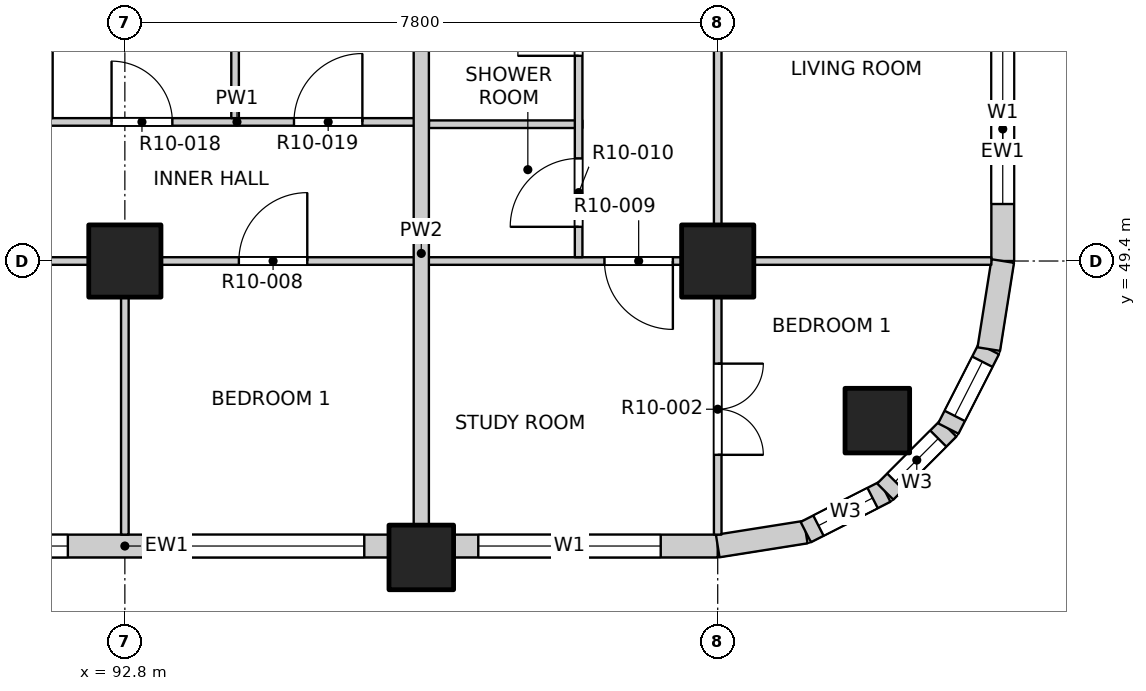
"""IFC4 building model, lengths in metres.
Left out: names, types, materials, properties, quantities, classifications, styles, units other than length and angle.
Written with IfcOpenShell. Run it as: python <this file> out.ifc"""

import sys

from ifc_helpers import new_model, si_unit, direction, frame, frame_2d, origin, origin_2d, place, context, subcontext, project, spatial, rectangle, extrude, element, fill, save


model = new_model("IFC4")
c1 = context("Model", 3, precision=1e-05, world=origin(), true_north=direction((0.0, 1.0)))
c2 = subcontext(c1, "Body", "Model", "MODEL_VIEW")
j1 = project(units=[si_unit("LENGTHUNIT", "METRE"), si_unit("PLANEANGLEUNIT", "RADIAN")], contexts=[c1])
p1 = place(None, origin())
s1 = spatial("IfcSite", under=j1, at=p1, CompositionType="ELEMENT")
p2 = place(p1, origin())
s2 = spatial("IfcBuilding", under=s1, at=p2, CompositionType="ELEMENT")
p3 = place(p2, frame((0.0, 0.0, 123.7)))
s3 = spatial("IfcBuildingStorey", under=s2, at=p3, CompositionType="ELEMENT", Elevation=123.7)
for number, where, z_axis, x_axis in (
    (1, (102.7, 47.3, -0.3), (0.0, 0.0, 1.0), (1.0, 0.0, 0.0)),
    (2, (96.7, 45.5, -0.3), (0.0, 0.0, 1.0), (1.0, 0.0, 0.0)),
):
    element("IfcColumn", number, at=place(p3, frame(where, z_axis=z_axis, x_axis=x_axis)), inside=s3, PredefinedType="COLUMN", context=c2, shape_type="SweptSolid", body=[
        extrude(rectangle(XDim=0.85, YDim=0.85, at=origin_2d()), origin(), (0.0, 0.0, 1.0), 3.45),
    ])
for number, where, z_axis, x_axis in (
    (3, (92.8, 49.4, -0.3), (0.0, 0.0, 1.0), (1.0, 0.0, 0.0)),
    (4, (100.6, 49.4, -0.3), (0.0, 0.0, 1.0), (1.0, 0.0, 0.0)),
):
    element("IfcColumn", number, at=place(p3, frame(where, z_axis=z_axis, x_axis=x_axis)), inside=s3, PredefinedType="COLUMN", context=c2, shape_type="SweptSolid", body=[
        extrude(rectangle(XDim=0.95, YDim=0.95, at=origin_2d()), origin(), (0.0, 0.0, 1.0), 3.45),
    ])
p4 = place(p3, frame((89.325, 45.65, 0.0), z_axis=(0.0, 0.0, 1.0), x_axis=(1.0, 0.0, 0.0)))
e5 = element("IfcWall", 5, at=p4, inside=s3, PredefinedType="SOLIDWALL", context=c2, shape_type="SweptSolid", body=[
    extrude(rectangle(XDim=6.95, YDim=0.3, at=frame_2d((3.475, 0.0))), origin(), (0.0, 0.0, 1.0), 2.7),
])
p5 = place(p4, frame((0.325, 0.0, 0.9)))
e6 = element("IfcOpeningElement", 6, at=p5, cuts=e5, PredefinedType="OPENING", context=c2, shape_type="SweptSolid", body=[
    extrude(rectangle(XDim=2.4, YDim=1.8, at=frame_2d((1.2, 0.9))), frame((0.0, 0.16, 0.0), z_axis=(0.0, -1.0, 0.0), x_axis=(1.0, 0.0, 0.0)), (0.0, 0.0, 1.0), 0.32),
])
p6 = place(p4, frame((4.225, 0.0, 0.9)))
e7 = element("IfcOpeningElement", 7, at=p6, cuts=e5, PredefinedType="OPENING", context=c2, shape_type="SweptSolid", body=[
    extrude(rectangle(XDim=2.4, YDim=1.8, at=frame_2d((1.2, 0.9))), frame((0.0, 0.16, 0.0), z_axis=(0.0, -1.0, 0.0), x_axis=(1.0, 0.0, 0.0)), (0.0, 0.0, 1.0), 0.32),
])
p7 = place(p3, frame((97.125, 45.65, 0.0), z_axis=(0.0, 0.0, 1.0), x_axis=(1.0, 0.0, 0.0)))
e8 = element("IfcWall", 8, at=p7, inside=s3, PredefinedType="SOLIDWALL", context=c2, shape_type="SweptSolid", body=[
    extrude(rectangle(XDim=3.475, YDim=0.3, at=frame_2d((1.738, 0.0))), origin(), (0.0, 0.0, 1.0), 2.7),
])
p8 = place(p7, frame((0.325, 0.0, 0.9)))
e9 = element("IfcOpeningElement", 9, at=p8, cuts=e8, PredefinedType="OPENING", context=c2, shape_type="SweptSolid", body=[
    extrude(rectangle(XDim=2.4, YDim=1.8, at=frame_2d((1.2, 0.9))), frame((0.0, 0.16, 0.0), z_axis=(0.0, -1.0, 0.0), x_axis=(1.0, 0.0, 0.0)), (0.0, 0.0, 1.0), 0.32),
])
p9 = place(p3, frame((104.35, 49.4, 0.0), z_axis=(0.0, 0.0, 1.0), x_axis=(0.0, 1.0, 0.0)))
e10 = element("IfcWall", 10, at=p9, inside=s3, PredefinedType="SOLIDWALL", context=c2, shape_type="SweptSolid", body=[
    extrude(rectangle(XDim=3.475, YDim=0.3, at=frame_2d((1.738, 0.0))), origin(), (0.0, 0.0, 1.0), 2.7),
])
p10 = place(p9, frame((0.75, 0.0, 0.9)))
e11 = element("IfcOpeningElement", 11, at=p10, cuts=e10, PredefinedType="OPENING", context=c2, shape_type="SweptSolid", body=[
    extrude(rectangle(XDim=2.4, YDim=1.8, at=frame_2d((1.2, 0.9))), frame((0.0, 0.16, 0.0), z_axis=(0.0, -1.0, 0.0), x_axis=(1.0, 0.0, 0.0)), (0.0, 0.0, 1.0), 0.32),
])
p11 = place(p3, frame((100.6, 45.65, 0.0), z_axis=(0.0, 0.0, 1.0), x_axis=(0.987678452879, 0.156496880861, 0.0)))
e12 = element("IfcWall", 12, at=p11, inside=s3, PredefinedType="SOLIDWALL", context=c2, shape_type="SweptSolid", body=[
    extrude(rectangle(XDim=1.173, YDim=0.3, at=frame_2d((0.586, 0.0))), origin(), (0.0, 0.0, 1.0), 2.7),
])
p12 = place(p3, frame((101.759, 45.833, 0.0), z_axis=(0.0, 0.0, 1.0), x_axis=(0.890988677504, 0.454025524128, 0.0)))
e13 = element("IfcWall", 13, at=p12, inside=s3, PredefinedType="SOLIDWALL", context=c2, shape_type="SweptSolid", body=[
    extrude(rectangle(XDim=1.173, YDim=0.3, at=frame_2d((0.587, 0.0))), origin(), (0.0, 0.0, 1.0), 2.7),
])
p13 = place(p12, frame((0.187, 0.0, 0.9)))
e14 = element("IfcOpeningElement", 14, at=p13, cuts=e13, PredefinedType="OPENING", context=c2, shape_type="SweptSolid", body=[
    extrude(rectangle(XDim=0.8, YDim=1.2, at=frame_2d((0.4, 0.6))), frame((0.0, 0.16, 0.0), z_axis=(0.0, -1.0, 0.0), x_axis=(1.0, 0.0, 0.0)), (0.0, 0.0, 1.0), 0.32),
])
p14 = place(p3, frame((102.804, 46.366, 0.0), z_axis=(0.0, 0.0, 1.0), x_axis=(0.707106781187, 0.707106781187, 0.0)))
e15 = element("IfcWall", 15, at=p14, inside=s3, PredefinedType="SOLIDWALL", context=c2, shape_type="SweptSolid", body=[
    extrude(rectangle(XDim=1.173, YDim=0.3, at=frame_2d((0.586, 0.0))), origin(), (0.0, 0.0, 1.0), 2.7),
])
p15 = place(p14, frame((0.187, 0.0, 0.9)))
e16 = element("IfcOpeningElement", 16, at=p15, cuts=e15, PredefinedType="OPENING", context=c2, shape_type="SweptSolid", body=[
    extrude(rectangle(XDim=0.8, YDim=1.2, at=frame_2d((0.4, 0.6))), frame((0.0, 0.16, 0.0), z_axis=(0.0, -1.0, 0.0), x_axis=(1.0, 0.0, 0.0)), (0.0, 0.0, 1.0), 0.32),
])
p16 = place(p3, frame((103.634, 47.196, 0.0), z_axis=(0.0, 0.0, 1.0), x_axis=(0.454025524128, 0.890988677504, 0.0)))
e17 = element("IfcWall", 17, at=p16, inside=s3, PredefinedType="SOLIDWALL", context=c2, shape_type="SweptSolid", body=[
    extrude(rectangle(XDim=1.173, YDim=0.3, at=frame_2d((0.587, 0.0))), origin(), (0.0, 0.0, 1.0), 2.7),
])
p17 = place(p16, frame((0.187, 0.0, 0.9)))
e18 = element("IfcOpeningElement", 18, at=p17, cuts=e17, PredefinedType="OPENING", context=c2, shape_type="SweptSolid", body=[
    extrude(rectangle(XDim=0.8, YDim=1.2, at=frame_2d((0.4, 0.6))), frame((0.0, 0.16, 0.0), z_axis=(0.0, -1.0, 0.0), x_axis=(1.0, 0.0, 0.0)), (0.0, 0.0, 1.0), 0.32),
])
p18 = place(p3, frame((104.167, 48.241, 0.0), z_axis=(0.0, 0.0, 1.0), x_axis=(0.156496880861, 0.987678452879, 0.0)))
e19 = element("IfcWall", 19, at=p18, inside=s3, PredefinedType="SOLIDWALL", context=c2, shape_type="SweptSolid", body=[
    extrude(rectangle(XDim=1.173, YDim=0.3, at=frame_2d((0.586, 0.0))), origin(), (0.0, 0.0, 1.0), 2.7),
])
p19 = place(p3, frame((65.8, 49.4, 0.0), z_axis=(0.0, 0.0, 1.0), x_axis=(1.0, 0.0, 0.0)))
e20 = element("IfcWall", 20, at=p19, inside=s3, PredefinedType="PARTITIONING", context=c2, shape_type="SweptSolid", body=[
    extrude(rectangle(XDim=38.4, YDim=0.1, at=frame_2d((19.2, 0.0))), origin(), (0.0, 0.0, 1.0), 3.15),
])
p20 = place(p19, frame((4.19, 0.0, 0.0)))
e21 = element("IfcOpeningElement", 21, at=p20, cuts=e20, PredefinedType="OPENING", context=c2, shape_type="SweptSolid", body=[
    extrude(rectangle(XDim=0.9, YDim=2.1, at=frame_2d((0.45, 1.05))), frame((0.0, 0.06, 0.0), z_axis=(0.0, -1.0, 0.0), x_axis=(1.0, 0.0, 0.0)), (0.0, 0.0, 1.0), 0.12),
])
p21 = place(p19, frame((9.0, 0.0, 0.0)))
e22 = element("IfcOpeningElement", 22, at=p21, cuts=e20, PredefinedType="OPENING", context=c2, shape_type="SweptSolid", body=[
    extrude(rectangle(XDim=0.9, YDim=2.1, at=frame_2d((0.45, 1.05))), frame((0.0, 0.06, 0.0), z_axis=(0.0, -1.0, 0.0), x_axis=(1.0, 0.0, 0.0)), (0.0, 0.0, 1.0), 0.12),
])
p22 = place(p19, frame((12.9, 0.0, 0.0)))
e23 = element("IfcOpeningElement", 23, at=p22, cuts=e20, PredefinedType="OPENING", context=c2, shape_type="SweptSolid", body=[
    extrude(rectangle(XDim=0.9, YDim=2.1, at=frame_2d((0.45, 1.05))), frame((0.0, 0.06, 0.0), z_axis=(0.0, -1.0, 0.0), x_axis=(1.0, 0.0, 0.0)), (0.0, 0.0, 1.0), 0.12),
])
p23 = place(p19, frame((16.8, 0.0, 0.0)))
e24 = element("IfcOpeningElement", 24, at=p23, cuts=e20, PredefinedType="OPENING", context=c2, shape_type="SweptSolid", body=[
    extrude(rectangle(XDim=0.9, YDim=2.1, at=frame_2d((0.45, 1.05))), frame((0.0, 0.06, 0.0), z_axis=(0.0, -1.0, 0.0), x_axis=(1.0, 0.0, 0.0)), (0.0, 0.0, 1.0), 0.12),
])
p24 = place(p19, frame((22.5, 0.0, 0.0)))
e25 = element("IfcOpeningElement", 25, at=p24, cuts=e20, PredefinedType="OPENING", context=c2, shape_type="SweptSolid", body=[
    extrude(rectangle(XDim=1.2, YDim=2.1, at=frame_2d((0.6, 1.05))), frame((0.0, 0.06, 0.0), z_axis=(0.0, -1.0, 0.0), x_axis=(1.0, 0.0, 0.0)), (0.0, 0.0, 1.0), 0.12),
])
p25 = place(p19, frame((28.5, 0.0, 0.0)))
e26 = element("IfcOpeningElement", 26, at=p25, cuts=e20, PredefinedType="OPENING", context=c2, shape_type="SweptSolid", body=[
    extrude(rectangle(XDim=0.9, YDim=2.1, at=frame_2d((0.45, 1.05))), frame((0.0, 0.06, 0.0), z_axis=(0.0, -1.0, 0.0), x_axis=(1.0, 0.0, 0.0)), (0.0, 0.0, 1.0), 0.12),
])
p26 = place(p19, frame((33.31, 0.0, 0.0)))
e27 = element("IfcOpeningElement", 27, at=p26, cuts=e20, PredefinedType="OPENING", context=c2, shape_type="SweptSolid", body=[
    extrude(rectangle(XDim=0.9, YDim=2.1, at=frame_2d((0.45, 1.05))), frame((0.0, 0.06, 0.0), z_axis=(0.0, -1.0, 0.0), x_axis=(1.0, 0.0, 0.0)), (0.0, 0.0, 1.0), 0.12),
])
p27 = place(p3, frame((96.8, 51.2, 0.0), z_axis=(0.0, 0.0, 1.0), x_axis=(1.0, 0.0, 0.0)))
e28 = element("IfcWall", 28, at=p27, inside=s3, PredefinedType="PARTITIONING", context=c2, shape_type="SweptSolid", body=[
    extrude(rectangle(XDim=2.02, YDim=0.1, at=frame_2d((1.01, 0.0))), origin(), (0.0, 0.0, 1.0), 3.15),
])
p28 = place(p3, frame((91.75, 51.23, 0.0), z_axis=(0.0, 0.0, 1.0), x_axis=(1.0, 0.0, 0.0)))
e29 = element("IfcWall", 29, at=p28, inside=s3, PredefinedType="PARTITIONING", context=c2, shape_type="SweptSolid", body=[
    extrude(rectangle(XDim=5.05, YDim=0.1, at=frame_2d((2.525, 0.0))), origin(), (0.0, 0.0, 1.0), 3.15),
])
p29 = place(p28, frame((0.875, 0.0, 0.0)))
e30 = element("IfcOpeningElement", 30, at=p29, cuts=e29, PredefinedType="OPENING", context=c2, shape_type="SweptSolid", body=[
    extrude(rectangle(XDim=0.8, YDim=2.1, at=frame_2d((0.4, 1.05))), frame((0.0, 0.06, 0.0), z_axis=(0.0, -1.0, 0.0), x_axis=(1.0, 0.0, 0.0)), (0.0, 0.0, 1.0), 0.12),
])
p30 = place(p28, frame((3.275, 0.0, 0.0)))
e31 = element("IfcOpeningElement", 31, at=p30, cuts=e29, PredefinedType="OPENING", context=c2, shape_type="SweptSolid", body=[
    extrude(rectangle(XDim=0.9, YDim=2.1, at=frame_2d((0.45, 1.05))), frame((0.0, 0.06, 0.0), z_axis=(0.0, -1.0, 0.0), x_axis=(1.0, 0.0, 0.0)), (0.0, 0.0, 1.0), 0.12),
])
p31 = place(p3, frame((92.8, 45.8, 0.0), z_axis=(0.0, 0.0, 1.0), x_axis=(0.0, 1.0, 0.0)))
e32 = element("IfcWall", 32, at=p31, inside=s3, PredefinedType="PARTITIONING", context=c2, shape_type="SweptSolid", body=[
    extrude(rectangle(XDim=3.55, YDim=0.1, at=frame_2d((1.775, 0.0))), origin(), (0.0, 0.0, 1.0), 3.15),
])
p32 = place(p3, frame((94.25, 51.28, 0.0), z_axis=(0.0, 0.0, 1.0), x_axis=(0.0, 1.0, 0.0)))
e33 = element("IfcWall", 33, at=p32, inside=s3, PredefinedType="PARTITIONING", context=c2, shape_type="SweptSolid", body=[
    extrude(rectangle(XDim=1.92, YDim=0.1, at=frame_2d((0.96, 0.0))), origin(), (0.0, 0.0, 1.0), 3.15),
])
p33 = place(p3, frame((96.7, 45.8, 0.0), z_axis=(0.0, 0.0, 1.0), x_axis=(0.0, 1.0, 0.0)))
e34 = element("IfcWall", 34, at=p33, inside=s3, PredefinedType="PARTITIONING", context=c2, shape_type="SweptSolid", body=[
    extrude(rectangle(XDim=7.4, YDim=0.2, at=frame_2d((3.7, 0.0))), origin(), (0.0, 0.0, 1.0), 3.15),
])
p34 = place(p3, frame((98.77, 49.45, 0.0), z_axis=(0.0, 0.0, 1.0), x_axis=(0.0, 1.0, 0.0)))
e35 = element("IfcWall", 35, at=p34, inside=s3, PredefinedType="PARTITIONING", context=c2, shape_type="SweptSolid", body=[
    extrude(rectangle(XDim=12.35, YDim=0.1, at=frame_2d((6.175, 0.0))), origin(), (0.0, 0.0, 1.0), 3.15),
])
p35 = place(p34, frame((0.4, 0.0, 0.0)))
e36 = element("IfcOpeningElement", 36, at=p35, cuts=e35, PredefinedType="OPENING", context=c2, shape_type="SweptSolid", body=[
    extrude(rectangle(XDim=0.9, YDim=2.1, at=frame_2d((0.45, 1.05))), frame((0.0, 0.06, 0.0), z_axis=(0.0, -1.0, 0.0), x_axis=(1.0, 0.0, 0.0)), (0.0, 0.0, 1.0), 0.12),
])
p36 = place(p34, frame((2.65, 0.0, 0.0)))
e37 = element("IfcOpeningElement", 37, at=p36, cuts=e35, PredefinedType="OPENING", context=c2, shape_type="SweptSolid", body=[
    extrude(rectangle(XDim=0.8, YDim=2.1, at=frame_2d((0.4, 1.05))), frame((0.0, 0.06, 0.0), z_axis=(0.0, -1.0, 0.0), x_axis=(1.0, 0.0, 0.0)), (0.0, 0.0, 1.0), 0.12),
])
p37 = place(p34, frame((5.29, 0.0, 0.0)))
e38 = element("IfcOpeningElement", 38, at=p37, cuts=e35, PredefinedType="OPENING", context=c2, shape_type="SweptSolid", body=[
    extrude(rectangle(XDim=0.8, YDim=2.1, at=frame_2d((0.4, 1.05))), frame((0.0, 0.06, 0.0), z_axis=(0.0, -1.0, 0.0), x_axis=(1.0, 0.0, 0.0)), (0.0, 0.0, 1.0), 0.12),
])
p38 = place(p34, frame((8.115, 0.0, 0.0)))
e39 = element("IfcOpeningElement", 39, at=p38, cuts=e35, PredefinedType="OPENING", context=c2, shape_type="SweptSolid", body=[
    extrude(rectangle(XDim=0.9, YDim=2.1, at=frame_2d((0.45, 1.05))), frame((0.0, 0.06, 0.0), z_axis=(0.0, -1.0, 0.0), x_axis=(1.0, 0.0, 0.0)), (0.0, 0.0, 1.0), 0.12),
])
p39 = place(p34, frame((10.85, 0.0, 0.0)))
e40 = element("IfcOpeningElement", 40, at=p39, cuts=e35, PredefinedType="OPENING", context=c2, shape_type="SweptSolid", body=[
    extrude(rectangle(XDim=0.8, YDim=2.1, at=frame_2d((0.4, 1.05))), frame((0.0, 0.06, 0.0), z_axis=(0.0, -1.0, 0.0), x_axis=(1.0, 0.0, 0.0)), (0.0, 0.0, 1.0), 0.12),
])
p40 = place(p3, frame((100.6, 45.8, 0.0), z_axis=(0.0, 0.0, 1.0), x_axis=(0.0, 1.0, 0.0)))
e41 = element("IfcWall", 41, at=p40, inside=s3, PredefinedType="PARTITIONING", context=c2, shape_type="SweptSolid", body=[
    extrude(rectangle(XDim=38.4, YDim=0.1, at=frame_2d((19.2, 0.0))), origin(), (0.0, 0.0, 1.0), 3.15),
])
p41 = place(p40, frame((1.05, 0.0, 0.0)))
e42 = element("IfcOpeningElement", 42, at=p41, cuts=e41, PredefinedType="OPENING", context=c2, shape_type="SweptSolid", body=[
    extrude(rectangle(XDim=1.2, YDim=2.1, at=frame_2d((0.6, 1.05))), frame((0.0, 0.06, 0.0), z_axis=(0.0, -1.0, 0.0), x_axis=(1.0, 0.0, 0.0)), (0.0, 0.0, 1.0), 0.12),
])
p42 = place(p40, frame((6.9, 0.0, 0.0)))
e43 = element("IfcOpeningElement", 43, at=p42, cuts=e41, PredefinedType="OPENING", context=c2, shape_type="SweptSolid", body=[
    extrude(rectangle(XDim=1.2, YDim=2.1, at=frame_2d((0.6, 1.05))), frame((0.0, 0.06, 0.0), z_axis=(0.0, -1.0, 0.0), x_axis=(1.0, 0.0, 0.0)), (0.0, 0.0, 1.0), 0.12),
])
p43 = place(p40, frame((12.9, 0.0, 0.0)))
e44 = element("IfcOpeningElement", 44, at=p43, cuts=e41, PredefinedType="OPENING", context=c2, shape_type="SweptSolid", body=[
    extrude(rectangle(XDim=0.9, YDim=2.1, at=frame_2d((0.45, 1.05))), frame((0.0, 0.06, 0.0), z_axis=(0.0, -1.0, 0.0), x_axis=(1.0, 0.0, 0.0)), (0.0, 0.0, 1.0), 0.12),
])
p44 = place(p40, frame((16.8, 0.0, 0.0)))
e45 = element("IfcOpeningElement", 45, at=p44, cuts=e41, PredefinedType="OPENING", context=c2, shape_type="SweptSolid", body=[
    extrude(rectangle(XDim=0.9, YDim=2.1, at=frame_2d((0.45, 1.05))), frame((0.0, 0.06, 0.0), z_axis=(0.0, -1.0, 0.0), x_axis=(1.0, 0.0, 0.0)), (0.0, 0.0, 1.0), 0.12),
])
p45 = place(p40, frame((20.7, 0.0, 0.0)))
e46 = element("IfcOpeningElement", 46, at=p45, cuts=e41, PredefinedType="OPENING", context=c2, shape_type="SweptSolid", body=[
    extrude(rectangle(XDim=0.9, YDim=2.1, at=frame_2d((0.45, 1.05))), frame((0.0, 0.06, 0.0), z_axis=(0.0, -1.0, 0.0), x_axis=(1.0, 0.0, 0.0)), (0.0, 0.0, 1.0), 0.12),
])
p46 = place(p40, frame((27.575, 0.0, 0.0)))
e47 = element("IfcOpeningElement", 47, at=p46, cuts=e41, PredefinedType="OPENING", context=c2, shape_type="SweptSolid", body=[
    extrude(rectangle(XDim=1.2, YDim=2.1, at=frame_2d((0.6, 1.05))), frame((0.0, 0.06, 0.0), z_axis=(0.0, -1.0, 0.0), x_axis=(1.0, 0.0, 0.0)), (0.0, 0.0, 1.0), 0.12),
])
p47 = place(p40, frame((32.4, 0.0, 0.0)))
e48 = element("IfcOpeningElement", 48, at=p47, cuts=e41, PredefinedType="OPENING", context=c2, shape_type="SweptSolid", body=[
    extrude(rectangle(XDim=0.9, YDim=2.1, at=frame_2d((0.45, 1.05))), frame((0.0, 0.06, 0.0), z_axis=(0.0, -1.0, 0.0), x_axis=(1.0, 0.0, 0.0)), (0.0, 0.0, 1.0), 0.12),
])
p48 = place(p40, frame((36.15, 0.0, 0.0)))
e49 = element("IfcOpeningElement", 49, at=p48, cuts=e41, PredefinedType="OPENING", context=c2, shape_type="SweptSolid", body=[
    extrude(rectangle(XDim=1.2, YDim=2.1, at=frame_2d((0.6, 1.05))), frame((0.0, 0.06, 0.0), z_axis=(0.0, -1.0, 0.0), x_axis=(1.0, 0.0, 0.0)), (0.0, 0.0, 1.0), 0.12),
])
p49 = place(p5, origin())
e50 = element("IfcWindow", 50, at=p49, inside=s3, PartitioningType="DOUBLE_PANEL_VERTICAL", PredefinedType="WINDOW", context=c2, shape_type="SweptSolid", body=[
    extrude(rectangle(XDim=2.4, YDim=1.8, at=frame_2d((1.2, 0.9))), frame((0.0, 0.03, 0.0), z_axis=(0.0, -1.0, 0.0), x_axis=(1.0, 0.0, 0.0)), (0.0, 0.0, 1.0), 0.06),
])
fill(e6, e50)
p50 = place(p6, origin())
e51 = element("IfcWindow", 51, at=p50, inside=s3, PartitioningType="DOUBLE_PANEL_VERTICAL", PredefinedType="WINDOW", context=c2, shape_type="SweptSolid", body=[
    extrude(rectangle(XDim=2.4, YDim=1.8, at=frame_2d((1.2, 0.9))), frame((0.0, 0.03, 0.0), z_axis=(0.0, -1.0, 0.0), x_axis=(1.0, 0.0, 0.0)), (0.0, 0.0, 1.0), 0.06),
])
fill(e7, e51)
p51 = place(p8, origin())
e52 = element("IfcWindow", 52, at=p51, inside=s3, PartitioningType="DOUBLE_PANEL_VERTICAL", PredefinedType="WINDOW", context=c2, shape_type="SweptSolid", body=[
    extrude(rectangle(XDim=2.4, YDim=1.8, at=frame_2d((1.2, 0.9))), frame((0.0, 0.03, 0.0), z_axis=(0.0, -1.0, 0.0), x_axis=(1.0, 0.0, 0.0)), (0.0, 0.0, 1.0), 0.06),
])
fill(e9, e52)
p52 = place(p10, origin())
e53 = element("IfcWindow", 53, at=p52, inside=s3, PartitioningType="DOUBLE_PANEL_VERTICAL", PredefinedType="WINDOW", context=c2, shape_type="SweptSolid", body=[
    extrude(rectangle(XDim=2.4, YDim=1.8, at=frame_2d((1.2, 0.9))), frame((0.0, 0.03, 0.0), z_axis=(0.0, -1.0, 0.0), x_axis=(1.0, 0.0, 0.0)), (0.0, 0.0, 1.0), 0.06),
])
fill(e11, e53)
p53 = place(p13, origin())
e54 = element("IfcWindow", 54, at=p53, inside=s3, PartitioningType="SINGLE_PANEL", PredefinedType="WINDOW", context=c2, shape_type="SweptSolid", body=[
    extrude(rectangle(XDim=0.8, YDim=1.2, at=frame_2d((0.4, 0.6))), frame((0.0, 0.03, 0.0), z_axis=(0.0, -1.0, 0.0), x_axis=(1.0, 0.0, 0.0)), (0.0, 0.0, 1.0), 0.06),
])
fill(e14, e54)
p54 = place(p15, origin())
e55 = element("IfcWindow", 55, at=p54, inside=s3, PartitioningType="SINGLE_PANEL", PredefinedType="WINDOW", context=c2, shape_type="SweptSolid", body=[
    extrude(rectangle(XDim=0.8, YDim=1.2, at=frame_2d((0.4, 0.6))), frame((0.0, 0.03, 0.0), z_axis=(0.0, -1.0, 0.0), x_axis=(1.0, 0.0, 0.0)), (0.0, 0.0, 1.0), 0.06),
])
fill(e16, e55)
p55 = place(p17, origin())
e56 = element("IfcWindow", 56, at=p55, inside=s3, PartitioningType="SINGLE_PANEL", PredefinedType="WINDOW", context=c2, shape_type="SweptSolid", body=[
    extrude(rectangle(XDim=0.8, YDim=1.2, at=frame_2d((0.4, 0.6))), frame((0.0, 0.03, 0.0), z_axis=(0.0, -1.0, 0.0), x_axis=(1.0, 0.0, 0.0)), (0.0, 0.0, 1.0), 0.06),
])
fill(e18, e56)
p56 = place(p41, origin())
e57 = element("IfcDoor", 57, at=p56, inside=s3, OperationType="DOUBLE_DOOR_SINGLE_SWING", PredefinedType="DOOR", context=c2, shape_type="SweptSolid", body=[
    extrude(rectangle(XDim=1.2, YDim=2.1, at=frame_2d((0.6, 1.05))), frame((0.0, 0.025, 0.0), z_axis=(0.0, -1.0, 0.0), x_axis=(1.0, 0.0, 0.0)), (0.0, 0.0, 1.0), 0.05),
])
fill(e42, e57)
p57 = place(p25, origin())
e58 = element("IfcDoor", 58, at=p57, inside=s3, OperationType="SINGLE_SWING_RIGHT", PredefinedType="DOOR", context=c2, shape_type="SweptSolid", body=[
    extrude(rectangle(XDim=0.9, YDim=2.1, at=frame_2d((0.45, 1.05))), frame((0.0, 0.025, 0.0), z_axis=(0.0, -1.0, 0.0), x_axis=(1.0, 0.0, 0.0)), (0.0, 0.0, 1.0), 0.05),
])
fill(e26, e58)
p58 = place(p26, origin())
e59 = element("IfcDoor", 59, at=p58, inside=s3, OperationType="SINGLE_SWING_LEFT", PredefinedType="DOOR", context=c2, shape_type="SweptSolid", body=[
    extrude(rectangle(XDim=0.9, YDim=2.1, at=frame_2d((0.45, 1.05))), frame((0.0, 0.025, 0.0), z_axis=(0.0, -1.0, 0.0), x_axis=(1.0, 0.0, 0.0)), (0.0, 0.0, 1.0), 0.05),
])
fill(e27, e59)
p59 = place(p35, origin())
e60 = element("IfcDoor", 60, at=p59, inside=s3, OperationType="SINGLE_SWING_LEFT", PredefinedType="DOOR", context=c2, shape_type="SweptSolid", body=[
    extrude(rectangle(XDim=0.9, YDim=2.1, at=frame_2d((0.45, 1.05))), frame((0.0, 0.025, 0.0), z_axis=(0.0, -1.0, 0.0), x_axis=(1.0, 0.0, 0.0)), (0.0, 0.0, 1.0), 0.05),
])
fill(e36, e60)
p60 = place(p29, origin())
e61 = element("IfcDoor", 61, at=p60, inside=s3, OperationType="SINGLE_SWING_LEFT", PredefinedType="DOOR", context=c2, shape_type="SweptSolid", body=[
    extrude(rectangle(XDim=0.8, YDim=2.1, at=frame_2d((0.4, 1.05))), frame((0.0, 0.025, 0.0), z_axis=(0.0, -1.0, 0.0), x_axis=(1.0, 0.0, 0.0)), (0.0, 0.0, 1.0), 0.05),
])
fill(e30, e61)
p61 = place(p30, origin())
e62 = element("IfcDoor", 62, at=p61, inside=s3, OperationType="SINGLE_SWING_RIGHT", PredefinedType="DOOR", context=c2, shape_type="SweptSolid", body=[
    extrude(rectangle(XDim=0.9, YDim=2.1, at=frame_2d((0.45, 1.05))), frame((0.0, 0.025, 0.0), z_axis=(0.0, -1.0, 0.0), x_axis=(1.0, 0.0, 0.0)), (0.0, 0.0, 1.0), 0.05),
])
fill(e31, e62)
p62 = place(p36, origin())
e63 = element("IfcDoor", 63, at=p62, inside=s3, OperationType="SINGLE_SWING_LEFT", PredefinedType="DOOR", context=c2, shape_type="SweptSolid", body=[
    extrude(rectangle(XDim=0.8, YDim=2.1, at=frame_2d((0.4, 1.05))), frame((0.0, 0.025, 0.0), z_axis=(0.0, -1.0, 0.0), x_axis=(1.0, 0.0, 0.0)), (0.0, 0.0, 1.0), 0.05),
])
fill(e37, e63)
save(model, sys.argv[1])
